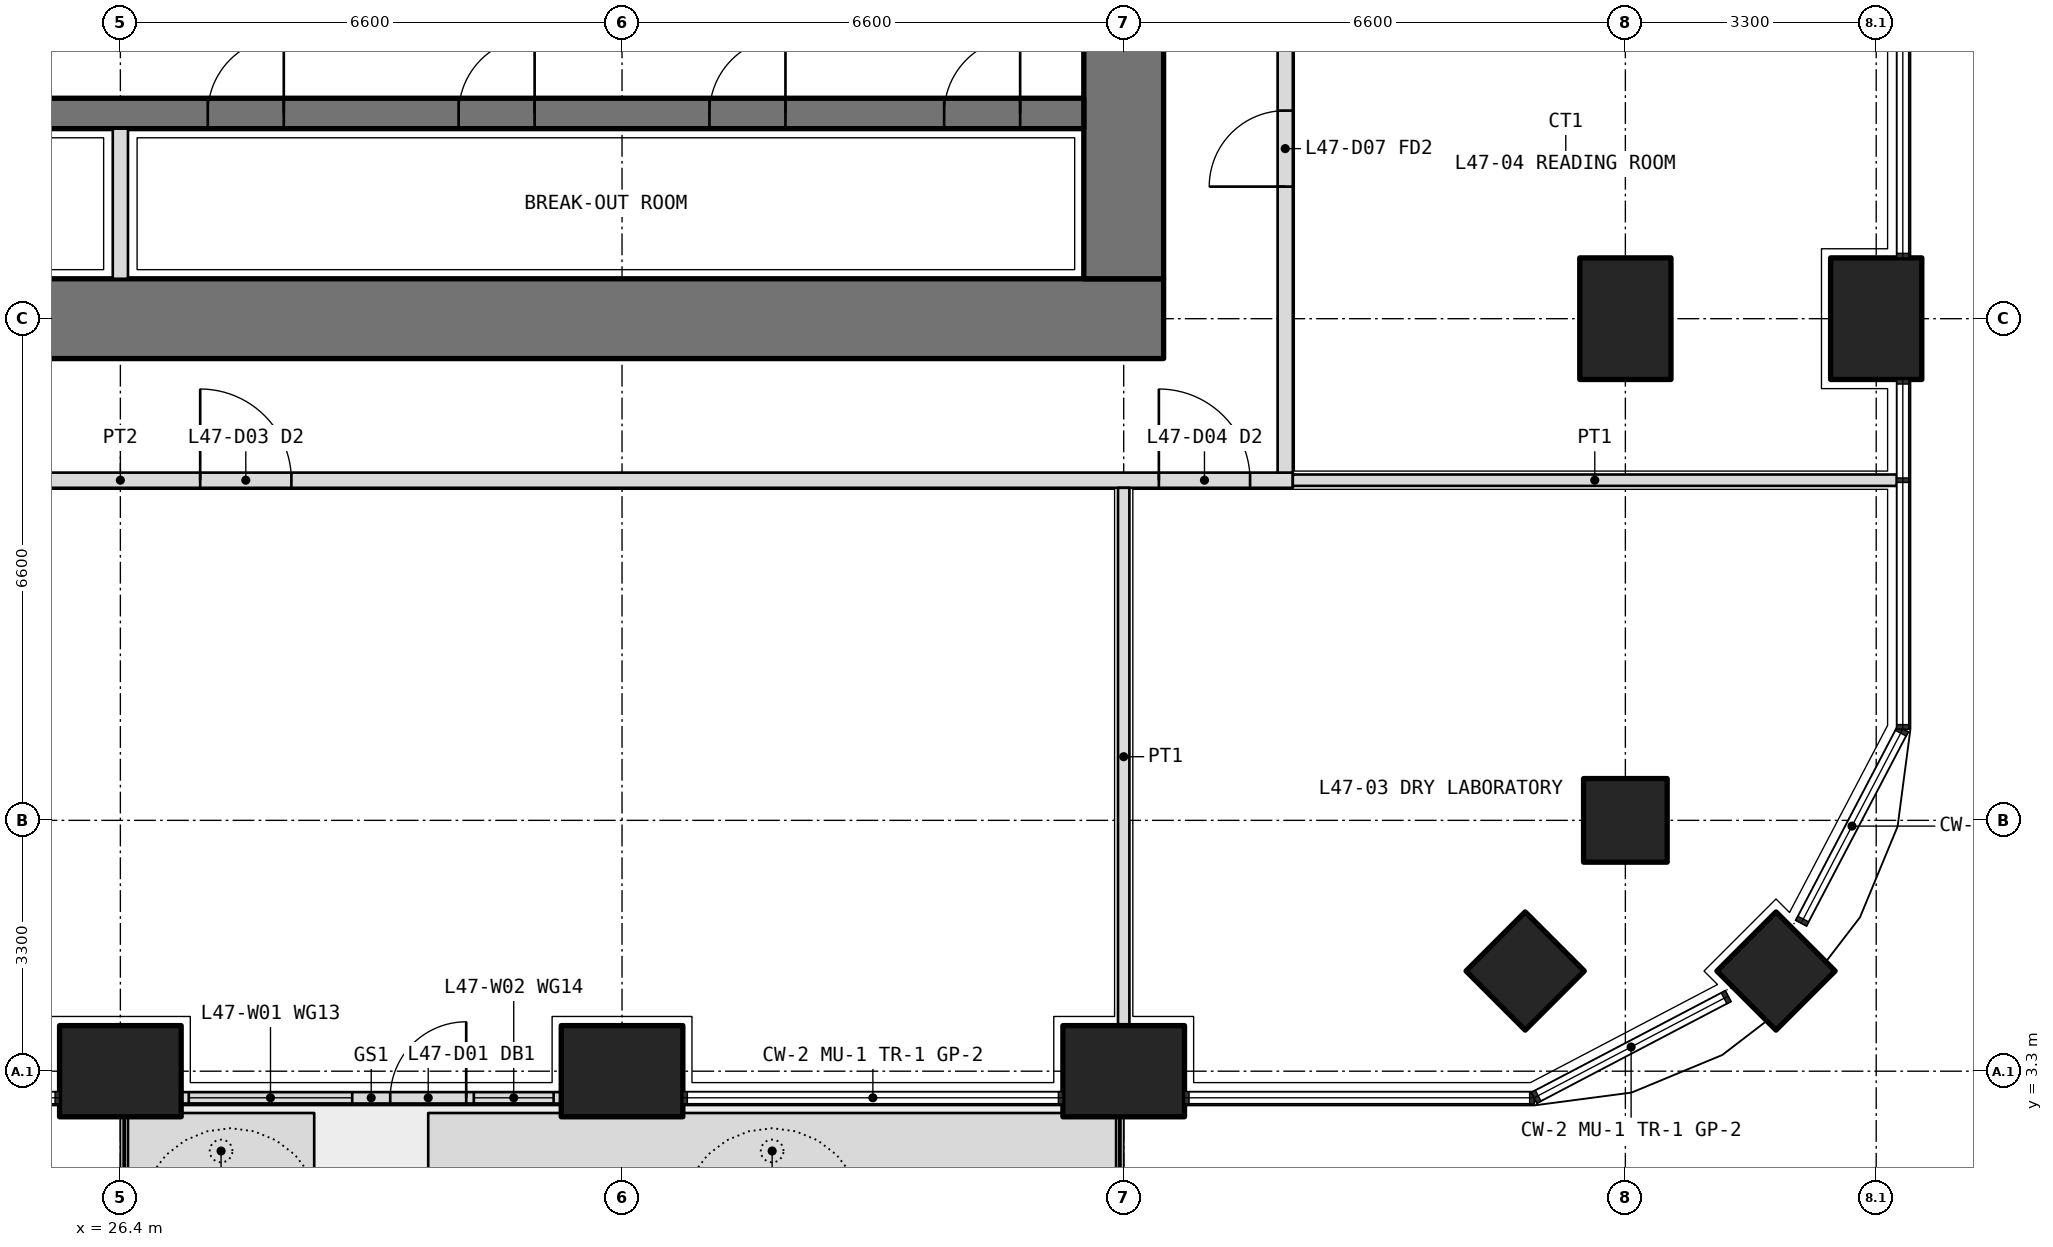
"""IFC4 building model, lengths in metres.
Left out: names, types, materials, properties, quantities, classifications, styles, units other than length and angle.
Written with IfcOpenShell. Run it as: python <this file> out.ifc"""

import sys

from ifc_helpers import new_model, si_unit, direction, frame, frame_2d, origin, origin_2d, place, context, subcontext, project, spatial, polyline, rectangle, outline, extrude, element, fill, save


model = new_model("IFC4")
c1 = context("Model", 3, precision=1e-05, world=origin(), true_north=direction((0.0, 1.0)))
c2 = subcontext(c1, "Body", "Model", "MODEL_VIEW")
j1 = project(units=[si_unit("LENGTHUNIT", "METRE"), si_unit("PLANEANGLEUNIT", "RADIAN")], contexts=[c1])
p1 = place(None, origin())
s1 = spatial("IfcSite", under=j1, at=p1, CompositionType="ELEMENT")
p2 = place(p1, origin())
s2 = spatial("IfcBuilding", under=s1, at=p2, CompositionType="ELEMENT")
p3 = place(p2, frame((0.0, 0.0, 206.1)))
s3 = spatial("IfcBuildingStorey", under=s2, at=p3, CompositionType="ELEMENT", Elevation=206.1)
p4 = place(p3, frame((48.182, 4.618, 0.0), z_axis=(0.0, 0.0, 1.0), x_axis=(0.707106781187, 0.707106781187, 0.0)))
e1 = element("IfcColumn", 1, at=p4, inside=s3, PredefinedType="COLUMN", context=c2, shape_type="SweptSolid", body=[
    extrude(rectangle(XDim=1.1, YDim=1.1, at=origin_2d()), origin(), (0.0, 0.0, 1.0), 4.2),
])
for number, where, z_axis, x_axis in (
    (2, (26.4, 3.3, 0.0), (0.0, 0.0, 1.0), (1.0, 0.0, 0.0)),
    (3, (33.0, 3.3, 0.0), (0.0, 0.0, 1.0), (1.0, 0.0, 0.0)),
    (4, (39.6, 3.3, 0.0), (0.0, 0.0, 1.0), (1.0, 0.0, 0.0)),
    (5, (49.5, 13.2, 0.0), (0.0, 0.0, 1.0), (0.0, 1.0, 0.0)),
):
    element("IfcColumn", number, at=place(p3, frame(where, z_axis=z_axis, x_axis=x_axis)), inside=s3, PredefinedType="COLUMN", context=c2, shape_type="SweptSolid", body=[
        extrude(rectangle(XDim=1.6, YDim=1.2, at=origin_2d()), origin(), (0.0, 0.0, 1.0), 4.2),
    ])
for number, where, z_axis, x_axis in (
    (6, (46.2, 6.6, 0.0), (0.0, 0.0, 1.0), (1.0, 0.0, 0.0)),
    (7, (44.882, 4.618, 0.0), (0.0, 0.0, 1.0), (0.707, 0.707, 0.0)),
):
    element("IfcColumn", number, at=place(p3, frame(where, z_axis=z_axis, x_axis=x_axis)), inside=s3, PredefinedType="COLUMN", context=c2, shape_type="SweptSolid", body=[
        extrude(rectangle(XDim=1.1, YDim=1.1, at=origin_2d()), origin(), (0.0, 0.0, 1.0), 4.2),
    ])
p5 = place(p3, frame((46.2, 13.2, 0.0), z_axis=(0.0, 0.0, 1.0), x_axis=(0.0, 1.0, 0.0)))
e8 = element("IfcColumn", 8, at=p5, inside=s3, PredefinedType="COLUMN", context=c2, shape_type="SweptSolid", body=[
    extrude(rectangle(XDim=1.6, YDim=1.2, at=origin_2d()), origin(), (0.0, 0.0, 1.0), 4.2),
])
p6 = place(p3, origin())
e9 = element("IfcWall", 9, at=p6, inside=s3, PredefinedType="USERDEFINED", context=c2, shape_type="SweptSolid", body=[
    extrude(outline(polyline([(26.5, 1.75), (28.95, 1.75), (28.95, 2.75), (26.5, 2.75), (26.5, 1.75)]), holes=[polyline([(26.65, 1.9), (28.8, 1.9), (28.8, 2.6), (26.65, 2.6), (26.65, 1.9)])]), origin(), (0.0, 0.0, 1.0), 1.05),
])
p7 = place(p3, origin())
e10 = element("IfcWall", 10, at=p7, inside=s3, PredefinedType="USERDEFINED", context=c2, shape_type="SweptSolid", body=[
    extrude(outline(polyline([(30.45, 1.75), (39.5, 1.75), (39.5, 2.75), (30.45, 2.75), (30.45, 1.75)]), holes=[polyline([(30.6, 1.9), (39.35, 1.9), (39.35, 2.6), (30.6, 2.6), (30.6, 1.9)])]), origin(), (0.0, 0.0, 1.0), 1.05),
])
p8 = place(p3, frame((27.2, 2.95, 0.0), z_axis=(0.0, 0.0, 1.0), x_axis=(1.0, 0.0, 0.0)))
e11 = element("IfcWall", 11, at=p8, inside=s3, PredefinedType="SOLIDWALL", context=c2, shape_type="SweptSolid", body=[
    extrude(rectangle(XDim=5.0, YDim=0.15, at=frame_2d((2.5, 0.0))), origin(), (0.0, 0.0, 1.0), 2.7),
])
p9 = place(p8, frame((2.75, 0.0, 0.0)))
e12 = element("IfcOpeningElement", 12, at=p9, cuts=e11, PredefinedType="OPENING", context=c2, shape_type="SweptSolid", body=[
    extrude(rectangle(XDim=1.0, YDim=2.4, at=frame_2d((0.5, 1.2))), frame((0.0, 0.085, 0.0), z_axis=(0.0, -1.0, 0.0), x_axis=(1.0, 0.0, 0.0)), (0.0, 0.0, 1.0), 0.17),
])
p10 = place(p8, frame((0.1, 0.0, 0.1)))
e13 = element("IfcOpeningElement", 13, at=p10, cuts=e11, PredefinedType="OPENING", context=c2, shape_type="SweptSolid", body=[
    extrude(rectangle(XDim=2.15, YDim=2.3, at=frame_2d((1.075, 1.15))), frame((0.0, 0.085, 0.0), z_axis=(0.0, -1.0, 0.0), x_axis=(1.0, 0.0, 0.0)), (0.0, 0.0, 1.0), 0.17),
])
p11 = place(p8, frame((3.85, 0.0, 0.1)))
e14 = element("IfcOpeningElement", 14, at=p11, cuts=e11, PredefinedType="OPENING", context=c2, shape_type="SweptSolid", body=[
    extrude(rectangle(XDim=1.05, YDim=2.3, at=frame_2d((0.525, 1.15))), frame((0.0, 0.085, 0.0), z_axis=(0.0, -1.0, 0.0), x_axis=(1.0, 0.0, 0.0)), (0.0, 0.0, 1.0), 0.17),
])
p12 = place(p3, frame((12.675, 13.2, 0.0), z_axis=(0.0, 0.0, 1.0), x_axis=(1.0, 0.0, 0.0)))
e15 = element("IfcWall", 15, at=p12, inside=s3, PredefinedType="SHEAR", context=c2, shape_type="SweptSolid", body=[
    extrude(rectangle(XDim=27.45, YDim=1.05, at=frame_2d((13.725, 0.0))), origin(), (0.0, 0.0, 1.0), 4.2),
])
p13 = place(p3, frame((39.6, 13.725, 0.0), z_axis=(0.0, 0.0, 1.0), x_axis=(0.0, 1.0, 0.0)))
e16 = element("IfcWall", 16, at=p13, inside=s3, PredefinedType="SHEAR", context=c2, shape_type="SweptSolid", body=[
    extrude(rectangle(XDim=18.75, YDim=1.05, at=frame_2d((9.375, 0.0))), origin(), (0.0, 0.0, 1.0), 4.2),
])
p14 = place(p13, frame((3.025, 0.0, 0.0)))
e17 = element("IfcOpeningElement", 17, at=p14, cuts=e16, PredefinedType="OPENING", context=c2, shape_type="SweptSolid", body=[
    extrude(rectangle(XDim=1.6, YDim=2.1, at=frame_2d((0.8, 1.05))), frame((0.0, 0.535, 0.0), z_axis=(0.0, -1.0, 0.0), x_axis=(1.0, 0.0, 0.0)), (0.0, 0.0, 1.0), 1.07),
])
p15 = place(p13, frame((13.825, 0.0, 0.0)))
e18 = element("IfcOpeningElement", 18, at=p15, cuts=e16, PredefinedType="OPENING", context=c2, shape_type="SweptSolid", body=[
    extrude(rectangle(XDim=1.6, YDim=2.1, at=frame_2d((0.8, 1.05))), frame((0.0, 0.535, 0.0), z_axis=(0.0, -1.0, 0.0), x_axis=(1.0, 0.0, 0.0)), (0.0, 0.0, 1.0), 1.07),
])
p16 = place(p3, frame((13.725, 15.9, 0.0), z_axis=(0.0, 0.0, 1.0), x_axis=(1.0, 0.0, 0.0)))
e19 = element("IfcWall", 19, at=p16, inside=s3, PredefinedType="SHEAR", context=c2, shape_type="SweptSolid", body=[
    extrude(rectangle(XDim=25.35, YDim=0.4, at=frame_2d((12.675, 0.0))), origin(), (0.0, 0.0, 1.0), 4.2),
])
p17 = place(p16, frame((0.837, 0.0, 0.0)))
e20 = element("IfcOpeningElement", 20, at=p17, cuts=e19, PredefinedType="OPENING", context=c2, shape_type="SweptSolid", body=[
    extrude(rectangle(XDim=1.0, YDim=2.1, at=frame_2d((0.5, 1.05))), frame((0.0, 0.21, 0.0), z_axis=(0.0, -1.0, 0.0), x_axis=(1.0, 0.0, 0.0)), (0.0, 0.0, 1.0), 0.42),
])
p18 = place(p16, frame((3.925, 0.0, 0.0)))
e21 = element("IfcOpeningElement", 21, at=p18, cuts=e19, PredefinedType="OPENING", context=c2, shape_type="SweptSolid", body=[
    extrude(rectangle(XDim=1.0, YDim=2.1, at=frame_2d((0.5, 1.05))), frame((0.0, 0.21, 0.0), z_axis=(0.0, -1.0, 0.0), x_axis=(1.0, 0.0, 0.0)), (0.0, 0.0, 1.0), 0.42),
])
p19 = place(p16, frame((7.225, 0.0, 0.0)))
e22 = element("IfcOpeningElement", 22, at=p19, cuts=e19, PredefinedType="OPENING", context=c2, shape_type="SweptSolid", body=[
    extrude(rectangle(XDim=1.0, YDim=2.1, at=frame_2d((0.5, 1.05))), frame((0.0, 0.21, 0.0), z_axis=(0.0, -1.0, 0.0), x_axis=(1.0, 0.0, 0.0)), (0.0, 0.0, 1.0), 0.42),
])
p20 = place(p16, frame((10.525, 0.0, 0.0)))
e23 = element("IfcOpeningElement", 23, at=p20, cuts=e19, PredefinedType="OPENING", context=c2, shape_type="SweptSolid", body=[
    extrude(rectangle(XDim=1.0, YDim=2.1, at=frame_2d((0.5, 1.05))), frame((0.0, 0.21, 0.0), z_axis=(0.0, -1.0, 0.0), x_axis=(1.0, 0.0, 0.0)), (0.0, 0.0, 1.0), 0.42),
])
p21 = place(p16, frame((13.825, 0.0, 0.0)))
e24 = element("IfcOpeningElement", 24, at=p21, cuts=e19, PredefinedType="OPENING", context=c2, shape_type="SweptSolid", body=[
    extrude(rectangle(XDim=1.0, YDim=2.1, at=frame_2d((0.5, 1.05))), frame((0.0, 0.21, 0.0), z_axis=(0.0, -1.0, 0.0), x_axis=(1.0, 0.0, 0.0)), (0.0, 0.0, 1.0), 0.42),
])
p22 = place(p16, frame((17.125, 0.0, 0.0)))
e25 = element("IfcOpeningElement", 25, at=p22, cuts=e19, PredefinedType="OPENING", context=c2, shape_type="SweptSolid", body=[
    extrude(rectangle(XDim=1.0, YDim=2.1, at=frame_2d((0.5, 1.05))), frame((0.0, 0.21, 0.0), z_axis=(0.0, -1.0, 0.0), x_axis=(1.0, 0.0, 0.0)), (0.0, 0.0, 1.0), 0.42),
])
p23 = place(p16, frame((20.425, 0.0, 0.0)))
e26 = element("IfcOpeningElement", 26, at=p23, cuts=e19, PredefinedType="OPENING", context=c2, shape_type="SweptSolid", body=[
    extrude(rectangle(XDim=1.0, YDim=2.1, at=frame_2d((0.5, 1.05))), frame((0.0, 0.21, 0.0), z_axis=(0.0, -1.0, 0.0), x_axis=(1.0, 0.0, 0.0)), (0.0, 0.0, 1.0), 0.42),
])
p24 = place(p16, frame((23.512, 0.0, 0.0)))
e27 = element("IfcOpeningElement", 27, at=p24, cuts=e19, PredefinedType="OPENING", context=c2, shape_type="SweptSolid", body=[
    extrude(rectangle(XDim=1.0, YDim=2.1, at=frame_2d((0.5, 1.05))), frame((0.0, 0.21, 0.0), z_axis=(0.0, -1.0, 0.0), x_axis=(1.0, 0.0, 0.0)), (0.0, 0.0, 1.0), 0.42),
])
p25 = place(p3, frame((26.4, 13.725, 0.0), z_axis=(0.0, 0.0, 1.0), x_axis=(0.0, 1.0, 0.0)))
e28 = element("IfcWall", 28, at=p25, inside=s3, PredefinedType="PARTITIONING", context=c2, shape_type="SweptSolid", body=[
    extrude(rectangle(XDim=1.975, YDim=0.2, at=frame_2d((0.987, 0.0))), origin(), (0.0, 0.0, 1.0), 4.2),
])
p26 = place(p3, frame((10.975, 11.075, 0.0), z_axis=(0.0, 0.0, 1.0), x_axis=(1.0, 0.0, 0.0)))
e29 = element("IfcWall", 29, at=p26, inside=s3, PredefinedType="PARTITIONING", context=c2, shape_type="SweptSolid", body=[
    extrude(rectangle(XDim=30.85, YDim=0.2, at=frame_2d((15.425, 0.0))), origin(), (0.0, 0.0, 1.0), 2.85),
])
p27 = place(p26, frame((2.212, 0.0, 0.0)))
e30 = element("IfcOpeningElement", 30, at=p27, cuts=e29, PredefinedType="OPENING", context=c2, shape_type="SweptSolid", body=[
    extrude(rectangle(XDim=1.2, YDim=2.1, at=frame_2d((0.6, 1.05))), frame((0.0, 0.11, 0.0), z_axis=(0.0, -1.0, 0.0), x_axis=(1.0, 0.0, 0.0)), (0.0, 0.0, 1.0), 0.22),
])
p28 = place(p26, frame((16.475, 0.0, 0.0)))
e31 = element("IfcOpeningElement", 31, at=p28, cuts=e29, PredefinedType="OPENING", context=c2, shape_type="SweptSolid", body=[
    extrude(rectangle(XDim=1.2, YDim=2.1, at=frame_2d((0.6, 1.05))), frame((0.0, 0.11, 0.0), z_axis=(0.0, -1.0, 0.0), x_axis=(1.0, 0.0, 0.0)), (0.0, 0.0, 1.0), 0.22),
])
p29 = place(p26, frame((29.087, 0.0, 0.0)))
e32 = element("IfcOpeningElement", 32, at=p29, cuts=e29, PredefinedType="OPENING", context=c2, shape_type="SweptSolid", body=[
    extrude(rectangle(XDim=1.2, YDim=2.1, at=frame_2d((0.6, 1.05))), frame((0.0, 0.11, 0.0), z_axis=(0.0, -1.0, 0.0), x_axis=(1.0, 0.0, 0.0)), (0.0, 0.0, 1.0), 0.22),
])
p30 = place(p3, frame((41.725, 11.175, 0.0), z_axis=(0.0, 0.0, 1.0), x_axis=(0.0, 1.0, 0.0)))
e33 = element("IfcWall", 33, at=p30, inside=s3, PredefinedType="PARTITIONING", context=c2, shape_type="SweptSolid", body=[
    extrude(rectangle(XDim=23.85, YDim=0.2, at=frame_2d((11.925, 0.0))), origin(), (0.0, 0.0, 1.0), 2.85),
])
p31 = place(p30, frame((3.762, 0.0, 0.0)))
e34 = element("IfcOpeningElement", 34, at=p31, cuts=e33, PredefinedType="OPENING", context=c2, shape_type="SweptSolid", body=[
    extrude(rectangle(XDim=1.0, YDim=2.1, at=frame_2d((0.5, 1.05))), frame((0.0, 0.11, 0.0), z_axis=(0.0, -1.0, 0.0), x_axis=(1.0, 0.0, 0.0)), (0.0, 0.0, 1.0), 0.22),
])
p32 = place(p30, frame((9.625, 0.0, 0.0)))
e35 = element("IfcOpeningElement", 35, at=p32, cuts=e33, PredefinedType="OPENING", context=c2, shape_type="SweptSolid", body=[
    extrude(rectangle(XDim=1.0, YDim=2.1, at=frame_2d((0.5, 1.05))), frame((0.0, 0.11, 0.0), z_axis=(0.0, -1.0, 0.0), x_axis=(1.0, 0.0, 0.0)), (0.0, 0.0, 1.0), 0.22),
])
p33 = place(p30, frame((12.975, 0.0, 0.0)))
e36 = element("IfcOpeningElement", 36, at=p33, cuts=e33, PredefinedType="OPENING", context=c2, shape_type="SweptSolid", body=[
    extrude(rectangle(XDim=0.9, YDim=2.1, at=frame_2d((0.45, 1.05))), frame((0.0, 0.11, 0.0), z_axis=(0.0, -1.0, 0.0), x_axis=(1.0, 0.0, 0.0)), (0.0, 0.0, 1.0), 0.22),
])
p34 = place(p30, frame((16.275, 0.0, 0.0)))
e37 = element("IfcOpeningElement", 37, at=p34, cuts=e33, PredefinedType="OPENING", context=c2, shape_type="SweptSolid", body=[
    extrude(rectangle(XDim=1.2, YDim=2.1, at=frame_2d((0.6, 1.05))), frame((0.0, 0.11, 0.0), z_axis=(0.0, -1.0, 0.0), x_axis=(1.0, 0.0, 0.0)), (0.0, 0.0, 1.0), 0.22),
])
p35 = place(p30, frame((20.738, 0.0, 0.0)))
e38 = element("IfcOpeningElement", 38, at=p35, cuts=e33, PredefinedType="OPENING", context=c2, shape_type="SweptSolid", body=[
    extrude(rectangle(XDim=1.0, YDim=2.1, at=frame_2d((0.5, 1.05))), frame((0.0, 0.11, 0.0), z_axis=(0.0, -1.0, 0.0), x_axis=(1.0, 0.0, 0.0)), (0.0, 0.0, 1.0), 0.22),
])
p36 = place(p3, frame((49.77, 11.075, 0.0), z_axis=(0.0, 0.0, 1.0), x_axis=(-1.0, 0.0, 0.0)))
e39 = element("IfcWall", 39, at=p36, inside=s3, PredefinedType="PARTITIONING", context=c2, shape_type="SweptSolid", body=[
    extrude(rectangle(XDim=7.945, YDim=0.15, at=frame_2d((3.973, 0.0))), origin(), (0.0, 0.0, 1.0), 2.7),
])
p37 = place(p3, frame((39.6, 3.9, 0.0), z_axis=(0.0, 0.0, 1.0), x_axis=(0.0, 1.0, 0.0)))
e40 = element("IfcWall", 40, at=p37, inside=s3, PredefinedType="PARTITIONING", context=c2, shape_type="SweptSolid", body=[
    extrude(rectangle(XDim=7.075, YDim=0.15, at=frame_2d((3.538, 0.0))), origin(), (0.0, 0.0, 1.0), 2.85),
])
p38 = place(p9, origin())
e41 = element("IfcDoor", 41, at=p38, inside=s3, OperationType="SINGLE_SWING_RIGHT", PredefinedType="DOOR", context=c2, shape_type="SweptSolid", body=[
    extrude(rectangle(XDim=1.0, YDim=2.4, at=frame_2d((0.5, 1.2))), frame((0.0, 0.025, 0.0), z_axis=(0.0, -1.0, 0.0), x_axis=(1.0, 0.0, 0.0)), (0.0, 0.0, 1.0), 0.05),
])
fill(e12, e41)
p39 = place(p10, origin())
e42 = element("IfcWindow", 42, at=p39, inside=s3, PartitioningType="SINGLE_PANEL", PredefinedType="WINDOW", context=c2, shape_type="SweptSolid", body=[
    extrude(rectangle(XDim=2.15, YDim=2.3, at=frame_2d((1.075, 1.15))), frame((0.0, 0.03, 0.0), z_axis=(0.0, -1.0, 0.0), x_axis=(1.0, 0.0, 0.0)), (0.0, 0.0, 1.0), 0.06),
])
fill(e13, e42)
p40 = place(p11, origin())
e43 = element("IfcWindow", 43, at=p40, inside=s3, PartitioningType="SINGLE_PANEL", PredefinedType="WINDOW", context=c2, shape_type="SweptSolid", body=[
    extrude(rectangle(XDim=1.05, YDim=2.3, at=frame_2d((0.525, 1.15))), frame((0.0, 0.03, 0.0), z_axis=(0.0, -1.0, 0.0), x_axis=(1.0, 0.0, 0.0)), (0.0, 0.0, 1.0), 0.06),
])
fill(e14, e43)
p41 = place(p28, origin())
e44 = element("IfcDoor", 44, at=p41, inside=s3, OperationType="DOUBLE_DOOR_SINGLE_SWING", PredefinedType="DOOR", context=c2, shape_type="SweptSolid", body=[
    extrude(rectangle(XDim=1.2, YDim=2.1, at=frame_2d((0.6, 1.05))), frame((0.0, 0.025, 0.0), z_axis=(0.0, -1.0, 0.0), x_axis=(1.0, 0.0, 0.0)), (0.0, 0.0, 1.0), 0.05),
])
fill(e31, e44)
p42 = place(p29, origin())
e45 = element("IfcDoor", 45, at=p42, inside=s3, OperationType="DOUBLE_DOOR_SINGLE_SWING", PredefinedType="DOOR", context=c2, shape_type="SweptSolid", body=[
    extrude(rectangle(XDim=1.2, YDim=2.1, at=frame_2d((0.6, 1.05))), frame((0.0, 0.025, 0.0), z_axis=(0.0, -1.0, 0.0), x_axis=(1.0, 0.0, 0.0)), (0.0, 0.0, 1.0), 0.05),
])
fill(e32, e45)
p43 = place(p31, origin())
e46 = element("IfcDoor", 46, at=p43, inside=s3, OperationType="SINGLE_SWING_LEFT", PredefinedType="DOOR", context=c2, shape_type="SweptSolid", body=[
    extrude(rectangle(XDim=1.0, YDim=2.1, at=frame_2d((0.5, 1.05))), frame((0.0, 0.025, 0.0), z_axis=(0.0, -1.0, 0.0), x_axis=(1.0, 0.0, 0.0)), (0.0, 0.0, 1.0), 0.05),
])
fill(e34, e46)
p44 = place(p21, origin())
e47 = element("IfcDoor", 47, at=p44, inside=s3, OperationType="SINGLE_SWING_RIGHT", PredefinedType="DOOR", context=c2, shape_type="SweptSolid", body=[
    extrude(rectangle(XDim=1.0, YDim=2.1, at=frame_2d((0.5, 1.05))), frame((0.0, 0.025, 0.0), z_axis=(0.0, -1.0, 0.0), x_axis=(1.0, 0.0, 0.0)), (0.0, 0.0, 1.0), 0.05),
])
fill(e24, e47)
p45 = place(p22, origin())
e48 = element("IfcDoor", 48, at=p45, inside=s3, OperationType="SINGLE_SWING_RIGHT", PredefinedType="DOOR", context=c2, shape_type="SweptSolid", body=[
    extrude(rectangle(XDim=1.0, YDim=2.1, at=frame_2d((0.5, 1.05))), frame((0.0, 0.025, 0.0), z_axis=(0.0, -1.0, 0.0), x_axis=(1.0, 0.0, 0.0)), (0.0, 0.0, 1.0), 0.05),
])
fill(e25, e48)
p46 = place(p23, origin())
e49 = element("IfcDoor", 49, at=p46, inside=s3, OperationType="SINGLE_SWING_RIGHT", PredefinedType="DOOR", context=c2, shape_type="SweptSolid", body=[
    extrude(rectangle(XDim=1.0, YDim=2.1, at=frame_2d((0.5, 1.05))), frame((0.0, 0.025, 0.0), z_axis=(0.0, -1.0, 0.0), x_axis=(1.0, 0.0, 0.0)), (0.0, 0.0, 1.0), 0.05),
])
fill(e26, e49)
p47 = place(p24, origin())
e50 = element("IfcDoor", 50, at=p47, inside=s3, OperationType="SINGLE_SWING_RIGHT", PredefinedType="DOOR", context=c2, shape_type="SweptSolid", body=[
    extrude(rectangle(XDim=1.0, YDim=2.1, at=frame_2d((0.5, 1.05))), frame((0.0, 0.025, 0.0), z_axis=(0.0, -1.0, 0.0), x_axis=(1.0, 0.0, 0.0)), (0.0, 0.0, 1.0), 0.05),
])
fill(e27, e50)
save(model, sys.argv[1])
